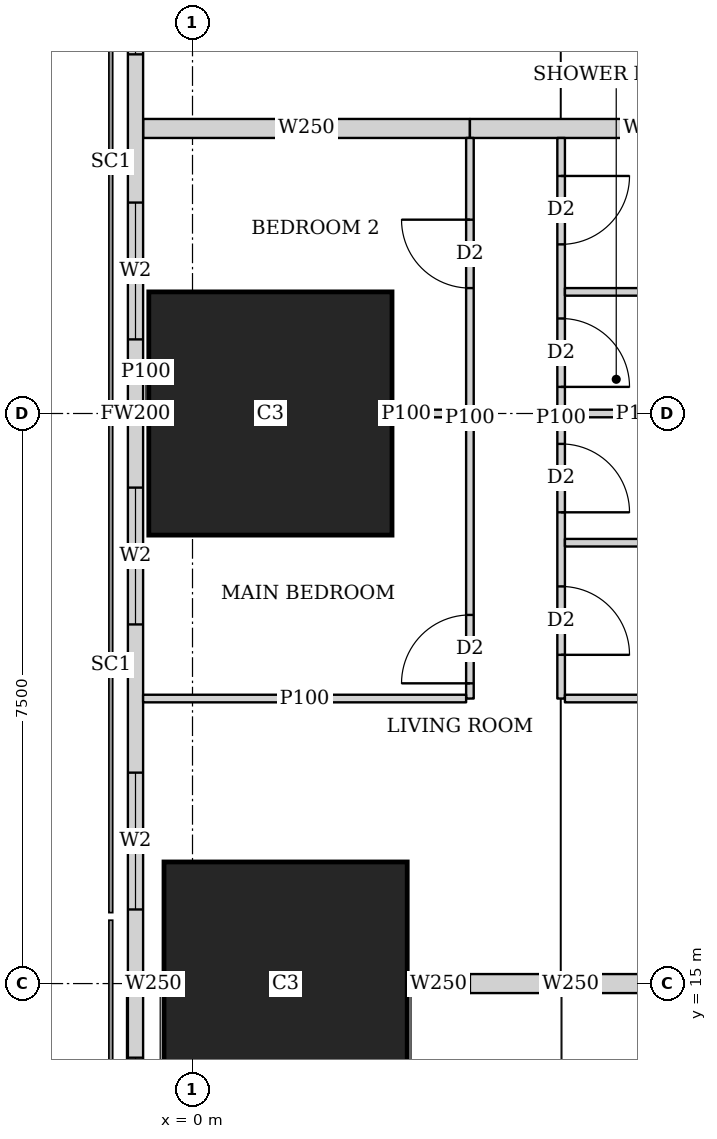
"""IFC4 building model, lengths in metres.
Left out: names, types, materials, properties, quantities, classifications, styles, units other than length and angle.
Written with IfcOpenShell. Run it as: python <this file> out.ifc"""

import sys

from ifc_helpers import new_model, si_unit, direction, frame, frame_2d, origin, origin_2d, place, context, subcontext, project, spatial, rectangle, extrude, element, fill, save


model = new_model("IFC4")
c1 = context("Model", 3, precision=1e-05, world=origin(), true_north=direction((0.0, 1.0)))
c2 = subcontext(c1, "Body", "Model", "MODEL_VIEW")
j1 = project(units=[si_unit("LENGTHUNIT", "METRE"), si_unit("PLANEANGLEUNIT", "RADIAN")], contexts=[c1])
p1 = place(None, origin())
s1 = spatial("IfcSite", under=j1, at=p1, CompositionType="ELEMENT")
p2 = place(p1, origin())
s2 = spatial("IfcBuilding", under=s1, at=p2, CompositionType="ELEMENT")
p3 = place(p2, frame((0.0, 0.0, 23.75)))
s3 = spatial("IfcBuildingStorey", under=s2, at=p3, CompositionType="ELEMENT", Elevation=23.75)
for number, where, z_axis, x_axis in (
    (1, (1.225, 15.0, 0.0), (0.0, 0.0, 1.0), (1.0, 0.0, 0.0)),
    (2, (1.025, 22.5, 0.0), (0.0, 0.0, 1.0), (1.0, 0.0, 0.0)),
):
    element("IfcColumn", number, at=place(p3, frame(where, z_axis=z_axis, x_axis=x_axis)), inside=s3, PredefinedType="COLUMN", context=c2, shape_type="SweptSolid", body=[
        extrude(rectangle(XDim=3.2, YDim=3.2, at=origin_2d()), origin(), (0.0, 0.0, 1.0), 3.75),
    ])
p4 = place(p3, frame((-0.75, 42.837, 0.0), z_axis=(0.0, 0.0, 1.0), x_axis=(0.0, -1.0, 0.0)))
e3 = element("IfcWall", 3, at=p4, inside=s3, PredefinedType="SOLIDWALL", context=c2, shape_type="SweptSolid", body=[
    extrude(rectangle(XDim=40.674, YDim=0.2, at=frame_2d((20.337, 0.0))), origin(), (0.0, 0.0, 1.0), 3.5),
])
p5 = place(p4, frame((1.78, 0.0, 0.9)))
e4 = element("IfcOpeningElement", 4, at=p5, cuts=e3, PredefinedType="OPENING", context=c2, shape_type="SweptSolid", body=[
    extrude(rectangle(XDim=1.8, YDim=1.5, at=frame_2d((0.9, 0.75))), frame((0.0, 0.11, 0.0), z_axis=(0.0, -1.0, 0.0), x_axis=(1.0, 0.0, 0.0)), (0.0, 0.0, 1.0), 0.22),
])
p6 = place(p4, frame((6.312, 0.0, 0.9)))
e5 = element("IfcOpeningElement", 5, at=p6, cuts=e3, PredefinedType="OPENING", context=c2, shape_type="SweptSolid", body=[
    extrude(rectangle(XDim=1.8, YDim=1.5, at=frame_2d((0.9, 0.75))), frame((0.0, 0.11, 0.0), z_axis=(0.0, -1.0, 0.0), x_axis=(1.0, 0.0, 0.0)), (0.0, 0.0, 1.0), 0.22),
])
p7 = place(p4, frame((10.062, 0.0, 0.9)))
e6 = element("IfcOpeningElement", 6, at=p7, cuts=e3, PredefinedType="OPENING", context=c2, shape_type="SweptSolid", body=[
    extrude(rectangle(XDim=1.8, YDim=1.5, at=frame_2d((0.9, 0.75))), frame((0.0, 0.11, 0.0), z_axis=(0.0, -1.0, 0.0), x_axis=(1.0, 0.0, 0.0)), (0.0, 0.0, 1.0), 0.22),
])
p8 = place(p4, frame((13.812, 0.0, 0.9)))
e7 = element("IfcOpeningElement", 7, at=p8, cuts=e3, PredefinedType="OPENING", context=c2, shape_type="SweptSolid", body=[
    extrude(rectangle(XDim=1.8, YDim=1.5, at=frame_2d((0.9, 0.75))), frame((0.0, 0.11, 0.0), z_axis=(0.0, -1.0, 0.0), x_axis=(1.0, 0.0, 0.0)), (0.0, 0.0, 1.0), 0.22),
])
p9 = place(p4, frame((17.562, 0.0, 0.9)))
e8 = element("IfcOpeningElement", 8, at=p9, cuts=e3, PredefinedType="OPENING", context=c2, shape_type="SweptSolid", body=[
    extrude(rectangle(XDim=1.8, YDim=1.5, at=frame_2d((0.9, 0.75))), frame((0.0, 0.11, 0.0), z_axis=(0.0, -1.0, 0.0), x_axis=(1.0, 0.0, 0.0)), (0.0, 0.0, 1.0), 0.22),
])
p10 = place(p4, frame((21.312, 0.0, 0.9)))
e9 = element("IfcOpeningElement", 9, at=p10, cuts=e3, PredefinedType="OPENING", context=c2, shape_type="SweptSolid", body=[
    extrude(rectangle(XDim=1.8, YDim=1.5, at=frame_2d((0.9, 0.75))), frame((0.0, 0.11, 0.0), z_axis=(0.0, -1.0, 0.0), x_axis=(1.0, 0.0, 0.0)), (0.0, 0.0, 1.0), 0.22),
])
p11 = place(p4, frame((25.062, 0.0, 0.9)))
e10 = element("IfcOpeningElement", 10, at=p11, cuts=e3, PredefinedType="OPENING", context=c2, shape_type="SweptSolid", body=[
    extrude(rectangle(XDim=1.8, YDim=1.5, at=frame_2d((0.9, 0.75))), frame((0.0, 0.11, 0.0), z_axis=(0.0, -1.0, 0.0), x_axis=(1.0, 0.0, 0.0)), (0.0, 0.0, 1.0), 0.22),
])
p12 = place(p4, frame((28.812, 0.0, 0.9)))
e11 = element("IfcOpeningElement", 11, at=p12, cuts=e3, PredefinedType="OPENING", context=c2, shape_type="SweptSolid", body=[
    extrude(rectangle(XDim=1.8, YDim=1.5, at=frame_2d((0.9, 0.75))), frame((0.0, 0.11, 0.0), z_axis=(0.0, -1.0, 0.0), x_axis=(1.0, 0.0, 0.0)), (0.0, 0.0, 1.0), 0.22),
])
p13 = place(p4, frame((32.562, 0.0, 0.9)))
e12 = element("IfcOpeningElement", 12, at=p13, cuts=e3, PredefinedType="OPENING", context=c2, shape_type="SweptSolid", body=[
    extrude(rectangle(XDim=1.8, YDim=1.5, at=frame_2d((0.9, 0.75))), frame((0.0, 0.11, 0.0), z_axis=(0.0, -1.0, 0.0), x_axis=(1.0, 0.0, 0.0)), (0.0, 0.0, 1.0), 0.22),
])
p14 = place(p4, frame((37.094, 0.0, 0.9)))
e13 = element("IfcOpeningElement", 13, at=p14, cuts=e3, PredefinedType="OPENING", context=c2, shape_type="SweptSolid", body=[
    extrude(rectangle(XDim=1.8, YDim=1.5, at=frame_2d((0.9, 0.75))), frame((0.0, 0.11, 0.0), z_axis=(0.0, -1.0, 0.0), x_axis=(1.0, 0.0, 0.0)), (0.0, 0.0, 1.0), 0.22),
])
p15 = place(p3, frame((3.65, 18.75, 0.0), z_axis=(0.0, 0.0, 1.0), x_axis=(0.0, 1.0, 0.0)))
e14 = element("IfcWall", 14, at=p15, inside=s3, PredefinedType="PARTITIONING", context=c2, shape_type="SweptSolid", body=[
    extrude(rectangle(XDim=7.375, YDim=0.1, at=frame_2d((3.688, 0.0))), origin(), (0.0, 0.0, 1.0), 3.5),
])
p16 = place(p15, frame((0.2, 0.0, 0.0)))
e15 = element("IfcOpeningElement", 15, at=p16, cuts=e14, PredefinedType="OPENING", context=c2, shape_type="SweptSolid", body=[
    extrude(rectangle(XDim=0.9, YDim=2.1, at=frame_2d((0.45, 1.05))), frame((0.0, 0.06, 0.0), z_axis=(0.0, -1.0, 0.0), x_axis=(1.0, 0.0, 0.0)), (0.0, 0.0, 1.0), 0.12),
])
p17 = place(p15, frame((5.4, 0.0, 0.0)))
e16 = element("IfcOpeningElement", 16, at=p17, cuts=e14, PredefinedType="OPENING", context=c2, shape_type="SweptSolid", body=[
    extrude(rectangle(XDim=0.9, YDim=2.1, at=frame_2d((0.45, 1.05))), frame((0.0, 0.06, 0.0), z_axis=(0.0, -1.0, 0.0), x_axis=(1.0, 0.0, 0.0)), (0.0, 0.0, 1.0), 0.12),
])
p18 = place(p3, frame((4.85, 18.75, 0.0), z_axis=(0.0, 0.0, 1.0), x_axis=(0.0, 1.0, 0.0)))
e17 = element("IfcWall", 17, at=p18, inside=s3, PredefinedType="PARTITIONING", context=c2, shape_type="SweptSolid", body=[
    extrude(rectangle(XDim=7.375, YDim=0.1, at=frame_2d((3.688, 0.0))), origin(), (0.0, 0.0, 1.0), 3.5),
])
p19 = place(p18, frame((0.575, 0.0, 0.0)))
e18 = element("IfcOpeningElement", 18, at=p19, cuts=e17, PredefinedType="OPENING", context=c2, shape_type="SweptSolid", body=[
    extrude(rectangle(XDim=0.9, YDim=2.1, at=frame_2d((0.45, 1.05))), frame((0.0, 0.06, 0.0), z_axis=(0.0, -1.0, 0.0), x_axis=(1.0, 0.0, 0.0)), (0.0, 0.0, 1.0), 0.12),
])
p20 = place(p18, frame((4.1, 0.0, 0.0)))
e19 = element("IfcOpeningElement", 19, at=p20, cuts=e17, PredefinedType="OPENING", context=c2, shape_type="SweptSolid", body=[
    extrude(rectangle(XDim=0.9, YDim=2.1, at=frame_2d((0.45, 1.05))), frame((0.0, 0.06, 0.0), z_axis=(0.0, -1.0, 0.0), x_axis=(1.0, 0.0, 0.0)), (0.0, 0.0, 1.0), 0.12),
])
p21 = place(p18, frame((2.45, 0.0, 0.0)))
e20 = element("IfcOpeningElement", 20, at=p21, cuts=e17, PredefinedType="OPENING", context=c2, shape_type="SweptSolid", body=[
    extrude(rectangle(XDim=0.9, YDim=2.1, at=frame_2d((0.45, 1.05))), frame((0.0, 0.06, 0.0), z_axis=(0.0, -1.0, 0.0), x_axis=(1.0, 0.0, 0.0)), (0.0, 0.0, 1.0), 0.12),
])
p22 = place(p18, frame((5.975, 0.0, 0.0)))
e21 = element("IfcOpeningElement", 21, at=p22, cuts=e17, PredefinedType="OPENING", context=c2, shape_type="SweptSolid", body=[
    extrude(rectangle(XDim=0.9, YDim=2.1, at=frame_2d((0.45, 1.05))), frame((0.0, 0.06, 0.0), z_axis=(0.0, -1.0, 0.0), x_axis=(1.0, 0.0, 0.0)), (0.0, 0.0, 1.0), 0.12),
])
p23 = place(p3, frame((-0.65, 18.75, 0.0), z_axis=(0.0, 0.0, 1.0), x_axis=(1.0, 0.0, 0.0)))
e22 = element("IfcWall", 22, at=p23, inside=s3, PredefinedType="PARTITIONING", context=c2, shape_type="SweptSolid", body=[
    extrude(rectangle(XDim=4.25, YDim=0.1, at=frame_2d((2.125, 0.0))), origin(), (0.0, 0.0, 1.0), 2.05),
])
p24 = place(p3, frame((-0.65, 22.5, 0.0), z_axis=(0.0, 0.0, 1.0), x_axis=(1.0, 0.0, 0.0)))
e23 = element("IfcWall", 23, at=p24, inside=s3, PredefinedType="PARTITIONING", context=c2, shape_type="SweptSolid", body=[
    extrude(rectangle(XDim=0.074, YDim=0.1, at=frame_2d((0.037, 0.0))), origin(), (0.0, 0.0, 1.0), 3.5),
])
p25 = place(p3, frame((2.626, 22.5, 0.0), z_axis=(0.0, 0.0, 1.0), x_axis=(1.0, 0.0, 0.0)))
e24 = element("IfcWall", 24, at=p25, inside=s3, PredefinedType="PARTITIONING", context=c2, shape_type="SweptSolid", body=[
    extrude(rectangle(XDim=0.974, YDim=0.1, at=frame_2d((0.487, 0.0))), origin(), (0.0, 0.0, 1.0), 3.5),
])
p26 = place(p3, frame((4.9, 18.75, 0.0), z_axis=(0.0, 0.0, 1.0), x_axis=(1.0, 0.0, 0.0)))
e25 = element("IfcWall", 25, at=p26, inside=s3, PredefinedType="PARTITIONING", context=c2, shape_type="SweptSolid", body=[
    extrude(rectangle(XDim=3.525, YDim=0.1, at=frame_2d((1.763, 0.0))), origin(), (0.0, 0.0, 1.0), 3.5),
])
p27 = place(p3, frame((4.9, 22.5, 0.0), z_axis=(0.0, 0.0, 1.0), x_axis=(1.0, 0.0, 0.0)))
e26 = element("IfcWall", 26, at=p27, inside=s3, PredefinedType="PARTITIONING", context=c2, shape_type="SweptSolid", body=[
    extrude(rectangle(XDim=1.399, YDim=0.1, at=frame_2d((0.7, 0.0))), origin(), (0.0, 0.0, 1.0), 3.5),
])
for number, where, z_axis, x_axis in (
    (27, (4.9, 20.8, 0.0), (0.0, 0.0, 1.0), (1.0, 0.0, 0.0)),
    (28, (4.9, 24.1, 0.0), (0.0, 0.0, 1.0), (1.0, 0.0, 0.0)),
):
    element("IfcWall", number, at=place(p3, frame(where, z_axis=z_axis, x_axis=x_axis)), inside=s3, PredefinedType="PARTITIONING", context=c2, shape_type="SweptSolid", body=[
        extrude(rectangle(XDim=3.525, YDim=0.1, at=frame_2d((1.763, 0.0))), origin(), (0.0, 0.0, 1.0), 3.5),
    ])
p28 = place(p3, frame((-0.65, 15.0, 0.0), z_axis=(0.0, 0.0, 1.0), x_axis=(1.0, 0.0, 0.0)))
e29 = element("IfcWall", 29, at=p28, inside=s3, PredefinedType="SOLIDWALL", context=c2, shape_type="SweptSolid", body=[
    extrude(rectangle(XDim=0.274, YDim=0.25, at=frame_2d((0.137, 0.0))), origin(), (0.0, 0.0, 1.0), 2.05),
])
p29 = place(p3, frame((2.826, 15.0, 0.0), z_axis=(0.0, 0.0, 1.0), x_axis=(1.0, 0.0, 0.0)))
e30 = element("IfcWall", 30, at=p29, inside=s3, PredefinedType="SOLIDWALL", context=c2, shape_type="SweptSolid", body=[
    extrude(rectangle(XDim=0.824, YDim=0.25, at=frame_2d((0.412, 0.0))), origin(), (0.0, 0.0, 1.0), 2.05),
])
p30 = place(p3, frame((3.65, 15.0, 0.0), z_axis=(0.0, 0.0, 1.0), x_axis=(1.0, 0.0, 0.0)))
e31 = element("IfcWall", 31, at=p30, inside=s3, PredefinedType="SOLIDWALL", context=c2, shape_type="SweptSolid", body=[
    extrude(rectangle(XDim=2.649, YDim=0.25, at=frame_2d((1.325, 0.0))), origin(), (0.0, 0.0, 1.0), 3.5),
])
p31 = place(p3, frame((-0.65, 26.25, 0.0), z_axis=(0.0, 0.0, 1.0), x_axis=(1.0, 0.0, 0.0)))
e32 = element("IfcWall", 32, at=p31, inside=s3, PredefinedType="SOLIDWALL", context=c2, shape_type="SweptSolid", body=[
    extrude(rectangle(XDim=4.3, YDim=0.25, at=frame_2d((2.15, 0.0))), origin(), (0.0, 0.0, 1.0), 2.05),
])
p32 = place(p3, frame((3.65, 26.25, 0.0), z_axis=(0.0, 0.0, 1.0), x_axis=(1.0, 0.0, 0.0)))
e33 = element("IfcWall", 33, at=p32, inside=s3, PredefinedType="SOLIDWALL", context=c2, shape_type="SweptSolid", body=[
    extrude(rectangle(XDim=4.775, YDim=0.25, at=frame_2d((2.388, 0.0))), origin(), (0.0, 0.0, 1.0), 3.5),
])
p33 = place(p8, origin())
e34 = element("IfcWindow", 34, at=p33, inside=s3, PartitioningType="SINGLE_PANEL", PredefinedType="WINDOW", context=c2, shape_type="SweptSolid", body=[
    extrude(rectangle(XDim=1.8, YDim=1.5, at=frame_2d((0.9, 0.75))), frame((0.0, 0.03, 0.0), z_axis=(0.0, -1.0, 0.0), x_axis=(1.0, 0.0, 0.0)), (0.0, 0.0, 1.0), 0.06),
])
fill(e7, e34)
p34 = place(p9, origin())
e35 = element("IfcWindow", 35, at=p34, inside=s3, PartitioningType="SINGLE_PANEL", PredefinedType="WINDOW", context=c2, shape_type="SweptSolid", body=[
    extrude(rectangle(XDim=1.8, YDim=1.5, at=frame_2d((0.9, 0.75))), frame((0.0, 0.03, 0.0), z_axis=(0.0, -1.0, 0.0), x_axis=(1.0, 0.0, 0.0)), (0.0, 0.0, 1.0), 0.06),
])
fill(e8, e35)
p35 = place(p10, origin())
e36 = element("IfcWindow", 36, at=p35, inside=s3, PartitioningType="SINGLE_PANEL", PredefinedType="WINDOW", context=c2, shape_type="SweptSolid", body=[
    extrude(rectangle(XDim=1.8, YDim=1.5, at=frame_2d((0.9, 0.75))), frame((0.0, 0.03, 0.0), z_axis=(0.0, -1.0, 0.0), x_axis=(1.0, 0.0, 0.0)), (0.0, 0.0, 1.0), 0.06),
])
fill(e9, e36)
p36 = place(p11, origin())
e37 = element("IfcWindow", 37, at=p36, inside=s3, PartitioningType="SINGLE_PANEL", PredefinedType="WINDOW", context=c2, shape_type="SweptSolid", body=[
    extrude(rectangle(XDim=1.8, YDim=1.5, at=frame_2d((0.9, 0.75))), frame((0.0, 0.03, 0.0), z_axis=(0.0, -1.0, 0.0), x_axis=(1.0, 0.0, 0.0)), (0.0, 0.0, 1.0), 0.06),
])
fill(e10, e37)
p37 = place(p12, origin())
e38 = element("IfcWindow", 38, at=p37, inside=s3, PartitioningType="SINGLE_PANEL", PredefinedType="WINDOW", context=c2, shape_type="SweptSolid", body=[
    extrude(rectangle(XDim=1.8, YDim=1.5, at=frame_2d((0.9, 0.75))), frame((0.0, 0.03, 0.0), z_axis=(0.0, -1.0, 0.0), x_axis=(1.0, 0.0, 0.0)), (0.0, 0.0, 1.0), 0.06),
])
fill(e11, e38)
p38 = place(p16, origin())
e39 = element("IfcDoor", 39, at=p38, inside=s3, OperationType="SINGLE_SWING_LEFT", PredefinedType="DOOR", context=c2, shape_type="SweptSolid", body=[
    extrude(rectangle(XDim=0.9, YDim=2.1, at=frame_2d((0.45, 1.05))), frame((0.0, 0.025, 0.0), z_axis=(0.0, -1.0, 0.0), x_axis=(1.0, 0.0, 0.0)), (0.0, 0.0, 1.0), 0.05),
])
fill(e15, e39)
p39 = place(p17, origin())
e40 = element("IfcDoor", 40, at=p39, inside=s3, OperationType="SINGLE_SWING_RIGHT", PredefinedType="DOOR", context=c2, shape_type="SweptSolid", body=[
    extrude(rectangle(XDim=0.9, YDim=2.1, at=frame_2d((0.45, 1.05))), frame((0.0, 0.025, 0.0), z_axis=(0.0, -1.0, 0.0), x_axis=(1.0, 0.0, 0.0)), (0.0, 0.0, 1.0), 0.05),
])
fill(e16, e40)
p40 = place(p19, origin())
e41 = element("IfcDoor", 41, at=p40, inside=s3, OperationType="SINGLE_SWING_RIGHT", PredefinedType="DOOR", context=c2, shape_type="SweptSolid", body=[
    extrude(rectangle(XDim=0.9, YDim=2.1, at=frame_2d((0.45, 1.05))), frame((0.0, 0.025, 0.0), z_axis=(0.0, -1.0, 0.0), x_axis=(1.0, 0.0, 0.0)), (0.0, 0.0, 1.0), 0.05),
])
fill(e18, e41)
p41 = place(p20, origin())
e42 = element("IfcDoor", 42, at=p41, inside=s3, OperationType="SINGLE_SWING_RIGHT", PredefinedType="DOOR", context=c2, shape_type="SweptSolid", body=[
    extrude(rectangle(XDim=0.9, YDim=2.1, at=frame_2d((0.45, 1.05))), frame((0.0, 0.025, 0.0), z_axis=(0.0, -1.0, 0.0), x_axis=(1.0, 0.0, 0.0)), (0.0, 0.0, 1.0), 0.05),
])
fill(e19, e42)
p42 = place(p21, origin())
e43 = element("IfcDoor", 43, at=p42, inside=s3, OperationType="SINGLE_SWING_RIGHT", PredefinedType="DOOR", context=c2, shape_type="SweptSolid", body=[
    extrude(rectangle(XDim=0.9, YDim=2.1, at=frame_2d((0.45, 1.05))), frame((0.0, 0.025, 0.0), z_axis=(0.0, -1.0, 0.0), x_axis=(1.0, 0.0, 0.0)), (0.0, 0.0, 1.0), 0.05),
])
fill(e20, e43)
p43 = place(p22, origin())
e44 = element("IfcDoor", 44, at=p43, inside=s3, OperationType="SINGLE_SWING_LEFT", PredefinedType="DOOR", context=c2, shape_type="SweptSolid", body=[
    extrude(rectangle(XDim=0.9, YDim=2.1, at=frame_2d((0.45, 1.05))), frame((0.0, 0.025, 0.0), z_axis=(0.0, -1.0, 0.0), x_axis=(1.0, 0.0, 0.0)), (0.0, 0.0, 1.0), 0.05),
])
fill(e21, e44)
save(model, sys.argv[1])
